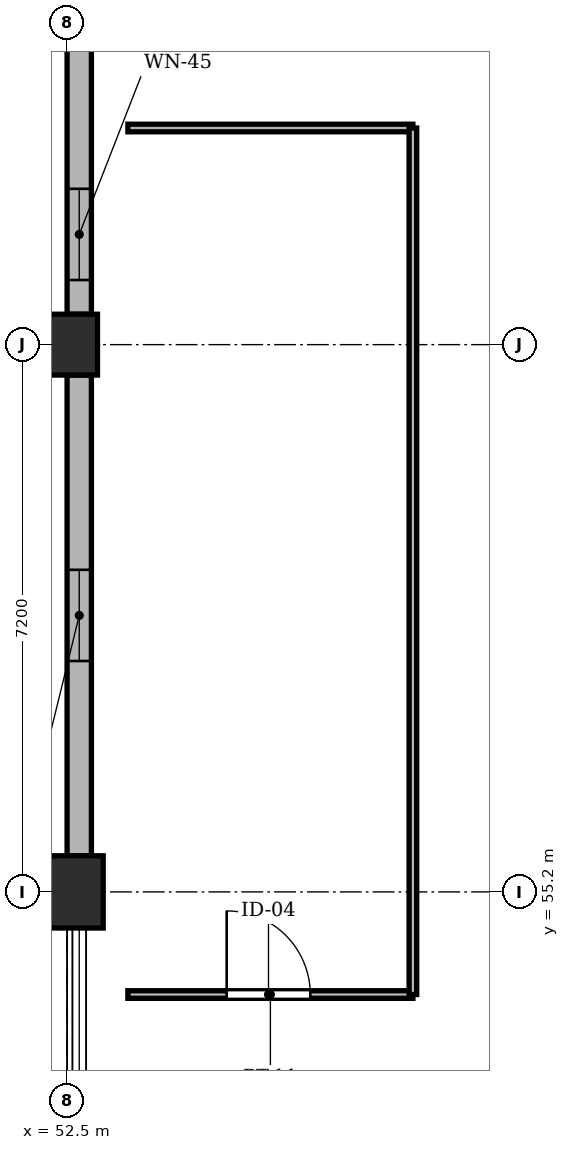
"""IFC4 building model, lengths in metres.
Left out: names, types, materials, properties, quantities, classifications, styles, units other than length and angle.
Written with IfcOpenShell. Run it as: python <this file> out.ifc"""

import sys

from ifc_helpers import new_model, si_unit, direction, frame, frame_2d, origin, origin_2d, place, context, subcontext, project, spatial, rectangle, extrude, element, fill, save


model = new_model("IFC4")
c1 = context("Model", 3, precision=1e-05, world=origin(), true_north=direction((0.0, 1.0)))
c2 = subcontext(c1, "Body", "Model", "MODEL_VIEW")
j1 = project(units=[si_unit("LENGTHUNIT", "METRE"), si_unit("PLANEANGLEUNIT", "RADIAN")], contexts=[c1])
p1 = place(None, origin())
s1 = spatial("IfcSite", under=j1, at=p1, CompositionType="ELEMENT")
p2 = place(p1, origin())
s2 = spatial("IfcBuilding", under=s1, at=p2, CompositionType="ELEMENT")
p3 = place(p2, frame((0.0, 0.0, 47.05)))
s3 = spatial("IfcBuildingStorey", under=s2, at=p3, CompositionType="ELEMENT", Elevation=47.05)
p4 = place(p3, frame((52.5, 55.2, -0.23), z_axis=(0.0, 0.0, 1.0), x_axis=(1.0, 0.0, 0.0)))
e1 = element("IfcColumn", 1, at=p4, inside=s3, PredefinedType="COLUMN", context=c2, shape_type="SweptSolid", body=[
    extrude(rectangle(XDim=0.95, YDim=0.95, at=origin_2d()), origin(), (0.0, 0.0, 1.0), 3.25),
])
p5 = place(p3, frame((52.5, 62.4, -0.23), z_axis=(0.0, 0.0, 1.0), x_axis=(1.0, 0.0, 0.0)))
e2 = element("IfcColumn", 2, at=p5, inside=s3, PredefinedType="COLUMN", context=c2, shape_type="SweptSolid", body=[
    extrude(rectangle(XDim=0.8, YDim=0.8, at=origin_2d()), origin(), (0.0, 0.0, 1.0), 3.25),
])
p6 = place(p3, frame((52.66, 68.4, 0.0), z_axis=(0.0, 0.0, 1.0), x_axis=(0.0, -1.0, 0.0)))
e3 = element("IfcWall", 3, at=p6, inside=s3, PredefinedType="SOLIDWALL", context=c2, shape_type="SweptSolid", body=[
    extrude(rectangle(XDim=5.6, YDim=0.32, at=frame_2d((2.8, 0.0))), origin(), (0.0, 0.0, 1.0), 2.53),
])
p7 = place(p6, frame((3.95, 0.0, 0.62)))
e4 = element("IfcOpeningElement", 4, at=p7, cuts=e3, PredefinedType="OPENING", context=c2, shape_type="SweptSolid", body=[
    extrude(rectangle(XDim=1.2, YDim=1.65, at=frame_2d((0.6, 0.825))), frame((0.0, 0.172, 0.0), z_axis=(0.0, -1.0, 0.0), x_axis=(1.0, 0.0, 0.0)), (0.0, 0.0, 1.0), 0.344),
])
p8 = place(p3, frame((52.66, 62.0, 0.0), z_axis=(0.0, 0.0, 1.0), x_axis=(0.0, -1.0, 0.0)))
e5 = element("IfcWall", 5, at=p8, inside=s3, PredefinedType="SOLIDWALL", context=c2, shape_type="SweptSolid", body=[
    extrude(rectangle(XDim=6.325, YDim=0.32, at=frame_2d((3.163, 0.0))), origin(), (0.0, 0.0, 1.0), 2.53),
])
p9 = place(p8, frame((2.562, 0.0, 0.62)))
e6 = element("IfcOpeningElement", 6, at=p9, cuts=e5, PredefinedType="OPENING", context=c2, shape_type="SweptSolid", body=[
    extrude(rectangle(XDim=1.2, YDim=1.7, at=frame_2d((0.6, 0.85))), frame((0.0, 0.172, 0.0), z_axis=(0.0, -1.0, 0.0), x_axis=(1.0, 0.0, 0.0)), (0.0, 0.0, 1.0), 0.344),
])
p10 = place(p3, frame((53.3, 53.85, 0.0), z_axis=(0.0, 0.0, 1.0), x_axis=(1.0, 0.0, 0.0)))
e7 = element("IfcWall", 7, at=p10, inside=s3, PredefinedType="PARTITIONING", context=c2, shape_type="SweptSolid", body=[
    extrude(rectangle(XDim=3.75, YDim=0.1, at=frame_2d((1.875, 0.0))), origin(), (0.0, 0.0, 1.0), 2.53),
])
p11 = place(p10, frame((1.3, 0.0, 0.0)))
e8 = element("IfcOpeningElement", 8, at=p11, cuts=e7, PredefinedType="OPENING", context=c2, shape_type="SweptSolid", body=[
    extrude(rectangle(XDim=1.1, YDim=2.15, at=frame_2d((0.55, 1.075))), frame((0.0, 0.062, 0.0), z_axis=(0.0, -1.0, 0.0), x_axis=(1.0, 0.0, 0.0)), (0.0, 0.0, 1.0), 0.124),
])
p12 = place(p3, frame((53.3, 65.25, 0.0), z_axis=(0.0, 0.0, 1.0), x_axis=(1.0, 0.0, 0.0)))
e9 = element("IfcWall", 9, at=p12, inside=s3, PredefinedType="PARTITIONING", context=c2, shape_type="SweptSolid", body=[
    extrude(rectangle(XDim=3.75, YDim=0.1, at=frame_2d((1.875, 0.0))), origin(), (0.0, 0.0, 1.0), 2.53),
])
p13 = place(p3, frame((57.05, 53.85, 0.0), z_axis=(0.0, 0.0, 1.0), x_axis=(0.0, 1.0, 0.0)))
e10 = element("IfcWall", 10, at=p13, inside=s3, PredefinedType="PARTITIONING", context=c2, shape_type="SweptSolid", body=[
    extrude(rectangle(XDim=11.4, YDim=0.1, at=frame_2d((5.7, 0.0))), origin(), (0.0, 0.0, 1.0), 2.53),
])
p14 = place(p7, origin())
e11 = element("IfcWindow", 11, at=p14, inside=s3, PartitioningType="SINGLE_PANEL", PredefinedType="WINDOW", context=c2, shape_type="SweptSolid", body=[
    extrude(rectangle(XDim=1.2, YDim=1.65, at=frame_2d((0.6, 0.825))), frame((0.0, 0.03, 0.0), z_axis=(0.0, -1.0, 0.0), x_axis=(1.0, 0.0, 0.0)), (0.0, 0.0, 1.0), 0.06),
])
fill(e4, e11)
p15 = place(p9, origin())
e12 = element("IfcWindow", 12, at=p15, inside=s3, PartitioningType="SINGLE_PANEL", PredefinedType="WINDOW", context=c2, shape_type="SweptSolid", body=[
    extrude(rectangle(XDim=1.2, YDim=1.7, at=frame_2d((0.6, 0.85))), frame((0.0, 0.03, 0.0), z_axis=(0.0, -1.0, 0.0), x_axis=(1.0, 0.0, 0.0)), (0.0, 0.0, 1.0), 0.06),
])
fill(e6, e12)
p16 = place(p11, origin())
e13 = element("IfcDoor", 13, at=p16, inside=s3, OperationType="SINGLE_SWING_LEFT", PredefinedType="DOOR", context=c2, shape_type="SweptSolid", body=[
    extrude(rectangle(XDim=1.1, YDim=2.15, at=frame_2d((0.55, 1.075))), frame((0.0, 0.025, 0.0), z_axis=(0.0, -1.0, 0.0), x_axis=(1.0, 0.0, 0.0)), (0.0, 0.0, 1.0), 0.05),
])
fill(e8, e13)
save(model, sys.argv[1])
